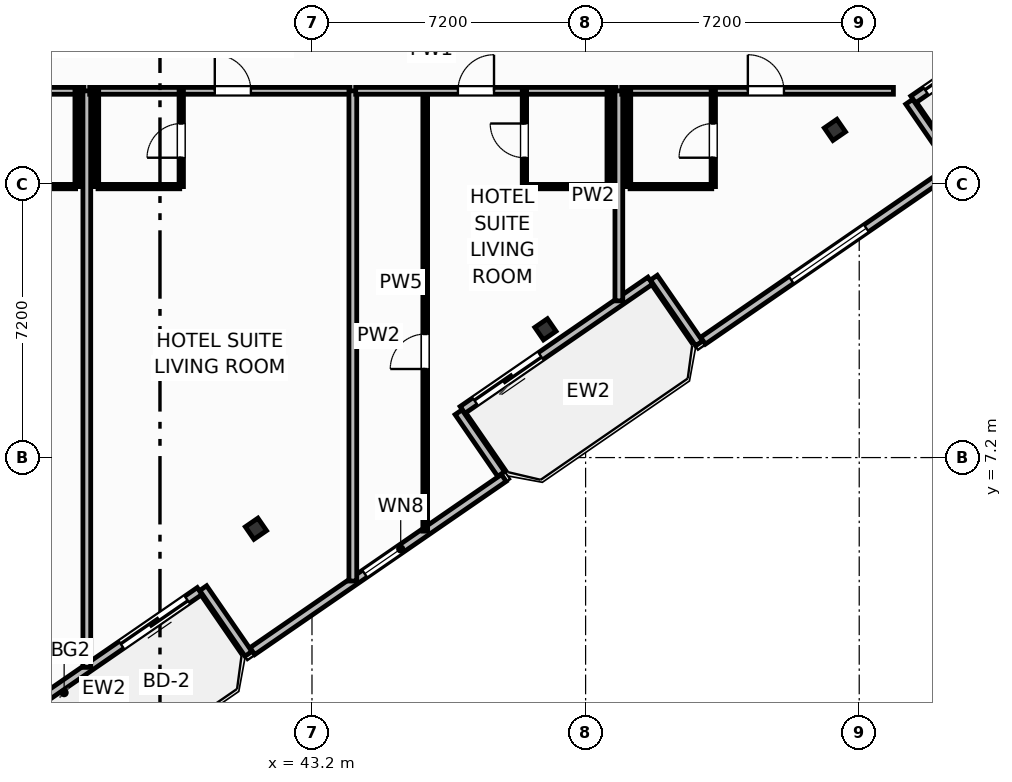
"""IFC4 building model, lengths in metres.
Left out: names, types, materials, properties, quantities, classifications, styles, units other than length and angle.
Written with IfcOpenShell. Run it as: python <this file> out.ifc"""

import sys

from ifc_helpers import new_model, si_unit, direction, frame, frame_2d, origin, origin_2d, place, context, subcontext, project, spatial, rectangle, i_section, extrude, element, fill, save


model = new_model("IFC4")
c1 = context("Model", 3, precision=1e-05, world=origin(), true_north=direction((0.0, 1.0)))
c2 = subcontext(c1, "Body", "Model", "MODEL_VIEW")
j1 = project(units=[si_unit("LENGTHUNIT", "METRE"), si_unit("PLANEANGLEUNIT", "RADIAN")], contexts=[c1])
p1 = place(None, origin())
s1 = spatial("IfcSite", under=j1, at=p1, CompositionType="ELEMENT")
p2 = place(p1, origin())
s2 = spatial("IfcBuilding", under=s1, at=p2, CompositionType="ELEMENT")
p3 = place(p2, frame((0.0, 0.0, 284.1)))
s3 = spatial("IfcBuildingStorey", under=s2, at=p3, CompositionType="ELEMENT", Elevation=284.1)
for number, where, z_axis, x_axis in (
    (1, (41.725, 5.328, 0.0), (0.0, 0.0, 1.0), (0.824, 0.567, 0.0)),
    (2, (49.343, 10.575, 0.0), (0.0, 0.0, 1.0), (0.824, 0.567, 0.0)),
    (3, (56.96, 15.823, 0.0), (0.0, 0.0, 1.0), (0.824, 0.567, 0.0)),
):
    element("IfcColumn", number, at=place(p3, frame(where, z_axis=z_axis, x_axis=x_axis)), inside=s3, PredefinedType="COLUMN", context=c2, shape_type="SweptSolid", body=[
        extrude(i_section(OverallWidth=0.401, OverallDepth=0.399, WebThickness=0.025, FlangeThickness=0.04, FilletRadius=0.022, at=origin_2d()), origin(), (0.0, 0.0, 1.0), 3.7),
    ])
p4 = place(p3, frame((40.244, 3.688, 0.0), z_axis=(0.0, 0.0, 1.0), x_axis=(-0.823541290762, -0.567256328665, 0.0)))
e4 = element("IfcWall", 4, at=p4, inside=s3, PredefinedType="SOLIDWALL", context=c2, shape_type="SweptSolid", body=[
    extrude(rectangle(XDim=5.567, YDim=0.22, at=frame_2d((2.784, 0.0))), origin(), (0.0, 0.0, 1.0), 2.73),
])
p5 = place(p4, frame((0.4, 0.0, 0.0)))
e5 = element("IfcOpeningElement", 5, at=p5, cuts=e4, PredefinedType="OPENING", context=c2, shape_type="SweptSolid", body=[
    extrude(rectangle(XDim=2.1, YDim=2.3, at=frame_2d((1.05, 1.15))), frame((0.0, 0.12, 0.0), z_axis=(0.0, -1.0, 0.0), x_axis=(1.0, 0.0, 0.0)), (0.0, 0.0, 1.0), 0.24),
])
p6 = place(p3, frame((52.103, 11.857, 0.0), z_axis=(0.0, 0.0, 1.0), x_axis=(-0.823534636215, -0.567265989598, 0.0)))
e6 = element("IfcWall", 6, at=p6, inside=s3, PredefinedType="SOLIDWALL", context=c2, shape_type="SweptSolid", body=[
    extrude(rectangle(XDim=6.0, YDim=0.22, at=frame_2d((3.0, 0.0))), origin(), (0.0, 0.0, 1.0), 2.73),
])
p7 = place(p6, frame((3.5, 0.0, 0.0)))
e7 = element("IfcOpeningElement", 7, at=p7, cuts=e6, PredefinedType="OPENING", context=c2, shape_type="SweptSolid", body=[
    extrude(rectangle(XDim=2.1, YDim=2.3, at=frame_2d((1.05, 1.15))), frame((0.0, 0.12, 0.0), z_axis=(0.0, -1.0, 0.0), x_axis=(1.0, 0.0, 0.0)), (0.0, 0.0, 1.0), 0.24),
])
p8 = place(p3, frame((63.605, 19.78, 0.0), z_axis=(0.0, 0.0, 1.0), x_axis=(-0.823541290762, -0.567256328665, 0.0)))
e8 = element("IfcWall", 8, at=p8, inside=s3, PredefinedType="SOLIDWALL", context=c2, shape_type="SweptSolid", body=[
    extrude(rectangle(XDim=5.567, YDim=0.22, at=frame_2d((2.784, 0.0))), origin(), (0.0, 0.0, 1.0), 2.73),
])
p9 = place(p8, frame((3.067, 0.0, 0.0)))
e9 = element("IfcOpeningElement", 9, at=p9, cuts=e8, PredefinedType="OPENING", context=c2, shape_type="SweptSolid", body=[
    extrude(rectangle(XDim=2.1, YDim=2.3, at=frame_2d((1.05, 1.15))), frame((0.0, 0.12, 0.0), z_axis=(0.0, -1.0, 0.0), x_axis=(1.0, 0.0, 0.0)), (0.0, 0.0, 1.0), 0.24),
])
p10 = place(p3, frame((40.337, 3.765, 0.0), z_axis=(0.0, 0.0, 1.0), x_axis=(0.567352541689, -0.823475010816, 0.0)))
e10 = element("IfcWall", 10, at=p10, inside=s3, PredefinedType="SOLIDWALL", context=c2, shape_type="SweptSolid", body=[
    extrude(rectangle(XDim=2.1, YDim=0.22, at=frame_2d((1.05, 0.0))), origin(), (0.0, 0.0, 1.0), 2.73),
])
p11 = place(p3, frame((41.631, 2.106, 0.0), z_axis=(0.0, 0.0, 1.0), x_axis=(0.823530942962, 0.56727135128, 0.0)))
e11 = element("IfcWall", 11, at=p11, inside=s3, PredefinedType="SOLIDWALL", context=c2, shape_type="SweptSolid", body=[
    extrude(rectangle(XDim=8.035, YDim=0.22, at=frame_2d((4.018, 0.0))), origin(), (0.0, 0.0, 1.0), 2.73),
])
p12 = place(p11, frame((3.59, 0.0, 0.8)))
e12 = element("IfcOpeningElement", 12, at=p12, cuts=e11, PredefinedType="OPENING", context=c2, shape_type="SweptSolid", body=[
    extrude(rectangle(XDim=1.15, YDim=1.4, at=frame_2d((0.575, 0.7))), frame((0.0, 0.12, 0.0), z_axis=(0.0, -1.0, 0.0), x_axis=(1.0, 0.0, 0.0)), (0.0, 0.0, 1.0), 0.24),
])
p13 = place(p3, frame((48.177, 6.767, 0.0), z_axis=(0.0, 0.0, 1.0), x_axis=(-0.567273565974, 0.823529417415, 0.0)))
e13 = element("IfcWall", 13, at=p13, inside=s3, PredefinedType="SOLIDWALL", context=c2, shape_type="SweptSolid", body=[
    extrude(rectangle(XDim=1.975, YDim=0.22, at=frame_2d((0.988, 0.0))), origin(), (0.0, 0.0, 1.0), 2.73),
])
p14 = place(p3, frame((52.196, 11.933, 0.0), z_axis=(0.0, 0.0, 1.0), x_axis=(0.56729822855, -0.823512428494, 0.0)))
e14 = element("IfcWall", 14, at=p14, inside=s3, PredefinedType="SOLIDWALL", context=c2, shape_type="SweptSolid", body=[
    extrude(rectangle(XDim=2.1, YDim=0.22, at=frame_2d((1.05, 0.0))), origin(), (0.0, 0.0, 1.0), 2.73),
])
p15 = place(p3, frame((53.49, 10.275, 0.0), z_axis=(0.0, 0.0, 1.0), x_axis=(0.823530942962, 0.56727135128, 0.0)))
e15 = element("IfcWall", 15, at=p15, inside=s3, PredefinedType="SOLIDWALL", context=c2, shape_type="SweptSolid", body=[
    extrude(rectangle(XDim=8.035, YDim=0.22, at=frame_2d((4.018, 0.0))), origin(), (0.0, 0.0, 1.0), 2.73),
])
p16 = place(p15, frame((2.817, 0.0, 0.8)))
e16 = element("IfcOpeningElement", 16, at=p16, cuts=e15, PredefinedType="OPENING", context=c2, shape_type="SweptSolid", body=[
    extrude(rectangle(XDim=2.4, YDim=1.85, at=frame_2d((1.2, 0.925))), frame((0.0, 0.12, 0.0), z_axis=(0.0, -1.0, 0.0), x_axis=(1.0, 0.0, 0.0)), (0.0, 0.0, 1.0), 0.24),
])
p17 = place(p3, frame((60.036, 14.936, 0.0), z_axis=(0.0, 0.0, 1.0), x_axis=(-0.567273565974, 0.823529417415, 0.0)))
e17 = element("IfcWall", 17, at=p17, inside=s3, PredefinedType="SOLIDWALL", context=c2, shape_type="SweptSolid", body=[
    extrude(rectangle(XDim=1.975, YDim=0.22, at=frame_2d((0.988, 0.0))), origin(), (0.0, 0.0, 1.0), 2.73),
])
p18 = place(p3, frame((30.35, 16.85, 0.0), z_axis=(0.0, 0.0, 1.0), x_axis=(1.0, 0.0, 0.0)))
e18 = element("IfcWall", 18, at=p18, inside=s3, PredefinedType="PARTITIONING", context=c2, shape_type="SweptSolid", body=[
    extrude(rectangle(XDim=6.85, YDim=0.18, at=frame_2d((3.425, 0.0))), origin(), (0.0, 0.0, 1.0), 3.45),
])
p19 = place(p18, frame((0.902, 0.0, 0.0)))
e19 = element("IfcOpeningElement", 19, at=p19, cuts=e18, PredefinedType="OPENING", context=c2, shape_type="SweptSolid", body=[
    extrude(rectangle(XDim=0.95, YDim=2.15, at=frame_2d((0.475, 1.075))), frame((0.0, 0.1, 0.0), z_axis=(0.0, -1.0, 0.0), x_axis=(1.0, 0.0, 0.0)), (0.0, 0.0, 1.0), 0.2),
])
p20 = place(p3, frame((34.83, 14.33, 0.0), z_axis=(0.0, 0.0, 1.0), x_axis=(1.0, 0.0, 0.0)))
e20 = element("IfcWall", 20, at=p20, inside=s3, PredefinedType="PARTITIONING", context=c2, shape_type="SweptSolid", body=[
    extrude(rectangle(XDim=2.15, YDim=0.115, at=frame_2d((1.075, 0.0))), origin(), (0.0, 0.0, 1.0), 3.45),
])
p21 = place(p3, frame((37.02, 14.33, 0.0), z_axis=(0.0, 0.0, 1.0), x_axis=(0.0, 1.0, 0.0)))
e21 = element("IfcWall", 21, at=p21, inside=s3, PredefinedType="PARTITIONING", context=c2, shape_type="SweptSolid", body=[
    extrude(rectangle(XDim=2.52, YDim=0.115, at=frame_2d((1.26, 0.0))), origin(), (0.0, 0.0, 1.0), 3.45),
])
p22 = place(p3, frame((37.275, 1.68, 0.0), z_axis=(0.0, 0.0, 1.0), x_axis=(0.0, 1.0, 0.0)))
e22 = element("IfcWall", 22, at=p22, inside=s3, PredefinedType="PARTITIONING", context=c2, shape_type="SweptSolid", body=[
    extrude(rectangle(XDim=15.17, YDim=0.205, at=frame_2d((7.585, 0.0))), origin(), (0.0, 0.0, 1.0), 3.45),
])
p23 = place(p3, frame((37.35, 16.85, 0.0), z_axis=(0.0, 0.0, 1.0), x_axis=(1.0, 0.0, 0.0)))
e23 = element("IfcWall", 23, at=p23, inside=s3, PredefinedType="PARTITIONING", context=c2, shape_type="SweptSolid", body=[
    extrude(rectangle(XDim=6.85, YDim=0.18, at=frame_2d((3.425, 0.0))), origin(), (0.0, 0.0, 1.0), 3.45),
])
p24 = place(p23, frame((3.292, 0.0, 0.0)))
e24 = element("IfcOpeningElement", 24, at=p24, cuts=e23, PredefinedType="OPENING", context=c2, shape_type="SweptSolid", body=[
    extrude(rectangle(XDim=0.95, YDim=2.15, at=frame_2d((0.475, 1.075))), frame((0.0, 0.1, 0.0), z_axis=(0.0, -1.0, 0.0), x_axis=(1.0, 0.0, 0.0)), (0.0, 0.0, 1.0), 0.2),
])
p25 = place(p3, frame((37.57, 14.33, 0.0), z_axis=(0.0, 0.0, 1.0), x_axis=(1.0, 0.0, 0.0)))
e25 = element("IfcWall", 25, at=p25, inside=s3, PredefinedType="PARTITIONING", context=c2, shape_type="SweptSolid", body=[
    extrude(rectangle(XDim=2.15, YDim=0.115, at=frame_2d((1.075, 0.0))), origin(), (0.0, 0.0, 1.0), 3.45),
])
p26 = place(p3, frame((39.76, 14.33, 0.0), z_axis=(0.0, 0.0, 1.0), x_axis=(0.0, 1.0, 0.0)))
e26 = element("IfcWall", 26, at=p26, inside=s3, PredefinedType="PARTITIONING", context=c2, shape_type="SweptSolid", body=[
    extrude(rectangle(XDim=2.52, YDim=0.115, at=frame_2d((1.26, 0.0))), origin(), (0.0, 0.0, 1.0), 3.45),
])
p27 = place(p26, frame((0.76, 0.0, 0.0)))
e27 = element("IfcOpeningElement", 27, at=p27, cuts=e26, PredefinedType="OPENING", context=c2, shape_type="SweptSolid", body=[
    extrude(rectangle(XDim=0.9, YDim=2.05, at=frame_2d((0.45, 1.025))), frame((0.0, 0.067, 0.0), z_axis=(0.0, -1.0, 0.0), x_axis=(1.0, 0.0, 0.0)), (0.0, 0.0, 1.0), 0.135),
])
p28 = place(p3, frame((37.53, 14.33, 0.0), z_axis=(0.0, 0.0, 1.0), x_axis=(0.0, 1.0, 0.0)))
e28 = element("IfcWall", 28, at=p28, inside=s3, PredefinedType="PARTITIONING", context=c2, shape_type="SweptSolid", body=[
    extrude(rectangle(XDim=2.52, YDim=0.115, at=frame_2d((1.26, 0.0))), origin(), (0.0, 0.0, 1.0), 3.45),
])
p29 = place(p3, frame((44.275, 3.952, 0.0), z_axis=(0.0, 0.0, 1.0), x_axis=(0.0, 1.0, 0.0)))
e29 = element("IfcWall", 29, at=p29, inside=s3, PredefinedType="PARTITIONING", context=c2, shape_type="SweptSolid", body=[
    extrude(rectangle(XDim=12.898, YDim=0.205, at=frame_2d((6.449, 0.0))), origin(), (0.0, 0.0, 1.0), 2.739),
])
p30 = place(p3, frame((46.18, 5.264, 0.0), z_axis=(0.0, 0.0, 1.0), x_axis=(0.0, 1.0, 0.0)))
e30 = element("IfcWall", 30, at=p30, inside=s3, PredefinedType="PARTITIONING", context=c2, shape_type="SweptSolid", body=[
    extrude(rectangle(XDim=11.586, YDim=0.125, at=frame_2d((5.793, 0.0))), origin(), (0.0, 0.0, 1.0), 3.45),
])
p31 = place(p30, frame((4.267, 0.0, 0.0)))
e31 = element("IfcOpeningElement", 31, at=p31, cuts=e30, PredefinedType="OPENING", context=c2, shape_type="SweptSolid", body=[
    extrude(rectangle(XDim=0.92, YDim=2.05, at=frame_2d((0.46, 1.025))), frame((0.0, 0.073, 0.0), z_axis=(0.0, -1.0, 0.0), x_axis=(1.0, 0.0, 0.0)), (0.0, 0.0, 1.0), 0.145),
])
p32 = place(p3, frame((44.35, 16.85, 0.0), z_axis=(0.0, 0.0, 1.0), x_axis=(1.0, 0.0, 0.0)))
e32 = element("IfcWall", 32, at=p32, inside=s3, PredefinedType="PARTITIONING", context=c2, shape_type="SweptSolid", body=[
    extrude(rectangle(XDim=6.85, YDim=0.18, at=frame_2d((3.425, 0.0))), origin(), (0.0, 0.0, 1.0), 3.45),
])
p33 = place(p32, frame((2.69, 0.0, 0.0)))
e33 = element("IfcOpeningElement", 33, at=p33, cuts=e32, PredefinedType="OPENING", context=c2, shape_type="SweptSolid", body=[
    extrude(rectangle(XDim=0.95, YDim=2.15, at=frame_2d((0.475, 1.075))), frame((0.0, 0.1, 0.0), z_axis=(0.0, -1.0, 0.0), x_axis=(1.0, 0.0, 0.0)), (0.0, 0.0, 1.0), 0.2),
])
p34 = place(p3, frame((48.83, 14.33, 0.0), z_axis=(0.0, 0.0, 1.0), x_axis=(1.0, 0.0, 0.0)))
e34 = element("IfcWall", 34, at=p34, inside=s3, PredefinedType="PARTITIONING", context=c2, shape_type="SweptSolid", body=[
    extrude(rectangle(XDim=2.15, YDim=0.115, at=frame_2d((1.075, 0.0))), origin(), (0.0, 0.0, 1.0), 3.45),
])
p35 = place(p3, frame((48.79, 14.33, 0.0), z_axis=(0.0, 0.0, 1.0), x_axis=(0.0, 1.0, 0.0)))
e35 = element("IfcWall", 35, at=p35, inside=s3, PredefinedType="PARTITIONING", context=c2, shape_type="SweptSolid", body=[
    extrude(rectangle(XDim=2.52, YDim=0.115, at=frame_2d((1.26, 0.0))), origin(), (0.0, 0.0, 1.0), 3.45),
])
p36 = place(p35, frame((0.76, 0.0, 0.0)))
e36 = element("IfcOpeningElement", 36, at=p36, cuts=e35, PredefinedType="OPENING", context=c2, shape_type="SweptSolid", body=[
    extrude(rectangle(XDim=0.9, YDim=2.05, at=frame_2d((0.45, 1.025))), frame((0.0, 0.067, 0.0), z_axis=(0.0, -1.0, 0.0), x_axis=(1.0, 0.0, 0.0)), (0.0, 0.0, 1.0), 0.135),
])
p37 = place(p3, frame((51.02, 14.33, 0.0), z_axis=(0.0, 0.0, 1.0), x_axis=(0.0, 1.0, 0.0)))
e37 = element("IfcWall", 37, at=p37, inside=s3, PredefinedType="PARTITIONING", context=c2, shape_type="SweptSolid", body=[
    extrude(rectangle(XDim=2.52, YDim=0.115, at=frame_2d((1.26, 0.0))), origin(), (0.0, 0.0, 1.0), 3.45),
])
p38 = place(p3, frame((51.275, 11.323, 0.0), z_axis=(0.0, 0.0, 1.0), x_axis=(0.0, 1.0, 0.0)))
e38 = element("IfcWall", 38, at=p38, inside=s3, PredefinedType="PARTITIONING", context=c2, shape_type="SweptSolid", body=[
    extrude(rectangle(XDim=5.527, YDim=0.205, at=frame_2d((2.763, 0.0))), origin(), (0.0, 0.0, 1.0), 3.45),
])
p39 = place(p3, frame((51.35, 16.85, 0.0), z_axis=(0.0, 0.0, 1.0), x_axis=(1.0, 0.0, 0.0)))
e39 = element("IfcWall", 39, at=p39, inside=s3, PredefinedType="PARTITIONING", context=c2, shape_type="SweptSolid", body=[
    extrude(rectangle(XDim=7.15, YDim=0.18, at=frame_2d((3.575, 0.0))), origin(), (0.0, 0.0, 1.0), 3.45),
])
p40 = place(p39, frame((3.32, 0.0, 0.0)))
e40 = element("IfcOpeningElement", 40, at=p40, cuts=e39, PredefinedType="OPENING", context=c2, shape_type="SweptSolid", body=[
    extrude(rectangle(XDim=0.95, YDim=2.15, at=frame_2d((0.475, 1.075))), frame((0.0, 0.1, 0.0), z_axis=(0.0, -1.0, 0.0), x_axis=(1.0, 0.0, 0.0)), (0.0, 0.0, 1.0), 0.2),
])
p41 = place(p3, frame((51.57, 14.33, 0.0), z_axis=(0.0, 0.0, 1.0), x_axis=(1.0, 0.0, 0.0)))
e41 = element("IfcWall", 41, at=p41, inside=s3, PredefinedType="PARTITIONING", context=c2, shape_type="SweptSolid", body=[
    extrude(rectangle(XDim=2.15, YDim=0.115, at=frame_2d((1.075, 0.0))), origin(), (0.0, 0.0, 1.0), 3.45),
])
p42 = place(p3, frame((53.76, 14.33, 0.0), z_axis=(0.0, 0.0, 1.0), x_axis=(0.0, 1.0, 0.0)))
e42 = element("IfcWall", 42, at=p42, inside=s3, PredefinedType="PARTITIONING", context=c2, shape_type="SweptSolid", body=[
    extrude(rectangle(XDim=2.52, YDim=0.115, at=frame_2d((1.26, 0.0))), origin(), (0.0, 0.0, 1.0), 3.45),
])
p43 = place(p42, frame((0.76, 0.0, 0.0)))
e43 = element("IfcOpeningElement", 43, at=p43, cuts=e42, PredefinedType="OPENING", context=c2, shape_type="SweptSolid", body=[
    extrude(rectangle(XDim=0.9, YDim=2.05, at=frame_2d((0.45, 1.025))), frame((0.0, 0.067, 0.0), z_axis=(0.0, -1.0, 0.0), x_axis=(1.0, 0.0, 0.0)), (0.0, 0.0, 1.0), 0.135),
])
p44 = place(p3, frame((51.53, 14.33, 0.0), z_axis=(0.0, 0.0, 1.0), x_axis=(0.0, 1.0, 0.0)))
e44 = element("IfcWall", 44, at=p44, inside=s3, PredefinedType="PARTITIONING", context=c2, shape_type="SweptSolid", body=[
    extrude(rectangle(XDim=2.52, YDim=0.115, at=frame_2d((1.26, 0.0))), origin(), (0.0, 0.0, 1.0), 3.45),
])
p45 = place(p5, origin())
e45 = element("IfcDoor", 45, at=p45, inside=s3, OperationType="SLIDING_TO_LEFT", PredefinedType="DOOR", context=c2, shape_type="SweptSolid", body=[
    extrude(rectangle(XDim=2.1, YDim=2.3, at=frame_2d((1.05, 1.15))), frame((0.0, 0.025, 0.0), z_axis=(0.0, -1.0, 0.0), x_axis=(1.0, 0.0, 0.0)), (0.0, 0.0, 1.0), 0.05),
])
fill(e5, e45)
p46 = place(p7, origin())
e46 = element("IfcDoor", 46, at=p46, inside=s3, OperationType="SLIDING_TO_LEFT", PredefinedType="DOOR", context=c2, shape_type="SweptSolid", body=[
    extrude(rectangle(XDim=2.1, YDim=2.3, at=frame_2d((1.05, 1.15))), frame((0.0, 0.025, 0.0), z_axis=(0.0, -1.0, 0.0), x_axis=(1.0, 0.0, 0.0)), (0.0, 0.0, 1.0), 0.05),
])
fill(e7, e46)
p47 = place(p9, origin())
e47 = element("IfcDoor", 47, at=p47, inside=s3, OperationType="SLIDING_TO_LEFT", PredefinedType="DOOR", context=c2, shape_type="SweptSolid", body=[
    extrude(rectangle(XDim=2.1, YDim=2.3, at=frame_2d((1.05, 1.15))), frame((0.0, 0.025, 0.0), z_axis=(0.0, -1.0, 0.0), x_axis=(1.0, 0.0, 0.0)), (0.0, 0.0, 1.0), 0.05),
])
fill(e9, e47)
p48 = place(p16, origin())
e48 = element("IfcWindow", 48, at=p48, inside=s3, PartitioningType="SINGLE_PANEL", PredefinedType="WINDOW", context=c2, shape_type="SweptSolid", body=[
    extrude(rectangle(XDim=2.4, YDim=1.85, at=frame_2d((1.2, 0.925))), frame((0.0, 0.03, 0.0), z_axis=(0.0, -1.0, 0.0), x_axis=(1.0, 0.0, 0.0)), (0.0, 0.0, 1.0), 0.06),
])
fill(e16, e48)
p49 = place(p24, origin())
e49 = element("IfcDoor", 49, at=p49, inside=s3, OperationType="SINGLE_SWING_LEFT", PredefinedType="DOOR", context=c2, shape_type="SweptSolid", body=[
    extrude(rectangle(XDim=0.95, YDim=2.15, at=frame_2d((0.475, 1.075))), frame((0.0, 0.025, 0.0), z_axis=(0.0, -1.0, 0.0), x_axis=(1.0, 0.0, 0.0)), (0.0, 0.0, 1.0), 0.05),
])
fill(e24, e49)
p50 = place(p27, origin())
e50 = element("IfcDoor", 50, at=p50, inside=s3, OperationType="SINGLE_SWING_LEFT", PredefinedType="DOOR", context=c2, shape_type="SweptSolid", body=[
    extrude(rectangle(XDim=0.9, YDim=2.05, at=frame_2d((0.45, 1.025))), frame((0.0, 0.025, 0.0), z_axis=(0.0, -1.0, 0.0), x_axis=(1.0, 0.0, 0.0)), (0.0, 0.0, 1.0), 0.05),
])
fill(e27, e50)
p51 = place(p31, origin())
e51 = element("IfcDoor", 51, at=p51, inside=s3, OperationType="SINGLE_SWING_LEFT", PredefinedType="DOOR", context=c2, shape_type="SweptSolid", body=[
    extrude(rectangle(XDim=0.92, YDim=2.05, at=frame_2d((0.46, 1.025))), frame((0.0, 0.025, 0.0), z_axis=(0.0, -1.0, 0.0), x_axis=(1.0, 0.0, 0.0)), (0.0, 0.0, 1.0), 0.05),
])
fill(e31, e51)
p52 = place(p33, origin())
e52 = element("IfcDoor", 52, at=p52, inside=s3, OperationType="SINGLE_SWING_RIGHT", PredefinedType="DOOR", context=c2, shape_type="SweptSolid", body=[
    extrude(rectangle(XDim=0.95, YDim=2.15, at=frame_2d((0.475, 1.075))), frame((0.0, 0.025, 0.0), z_axis=(0.0, -1.0, 0.0), x_axis=(1.0, 0.0, 0.0)), (0.0, 0.0, 1.0), 0.05),
])
fill(e33, e52)
p53 = place(p36, origin())
e53 = element("IfcDoor", 53, at=p53, inside=s3, OperationType="SINGLE_SWING_RIGHT", PredefinedType="DOOR", context=c2, shape_type="SweptSolid", body=[
    extrude(rectangle(XDim=0.9, YDim=2.05, at=frame_2d((0.45, 1.025))), frame((0.0, 0.025, 0.0), z_axis=(0.0, -1.0, 0.0), x_axis=(1.0, 0.0, 0.0)), (0.0, 0.0, 1.0), 0.05),
])
fill(e36, e53)
p54 = place(p40, origin())
e54 = element("IfcDoor", 54, at=p54, inside=s3, OperationType="SINGLE_SWING_LEFT", PredefinedType="DOOR", context=c2, shape_type="SweptSolid", body=[
    extrude(rectangle(XDim=0.95, YDim=2.15, at=frame_2d((0.475, 1.075))), frame((0.0, 0.025, 0.0), z_axis=(0.0, -1.0, 0.0), x_axis=(1.0, 0.0, 0.0)), (0.0, 0.0, 1.0), 0.05),
])
fill(e40, e54)
p55 = place(p43, origin())
e55 = element("IfcDoor", 55, at=p55, inside=s3, OperationType="SINGLE_SWING_LEFT", PredefinedType="DOOR", context=c2, shape_type="SweptSolid", body=[
    extrude(rectangle(XDim=0.9, YDim=2.05, at=frame_2d((0.45, 1.025))), frame((0.0, 0.025, 0.0), z_axis=(0.0, -1.0, 0.0), x_axis=(1.0, 0.0, 0.0)), (0.0, 0.0, 1.0), 0.05),
])
fill(e43, e55)
p56 = place(p12, origin())
e56 = element("IfcWindow", 56, at=p56, inside=s3, PartitioningType="SINGLE_PANEL", PredefinedType="WINDOW", context=c2, shape_type="SweptSolid", body=[
    extrude(rectangle(XDim=1.15, YDim=1.4, at=frame_2d((0.575, 0.7))), frame((0.0, 0.03, 0.0), z_axis=(0.0, -1.0, 0.0), x_axis=(1.0, 0.0, 0.0)), (0.0, 0.0, 1.0), 0.06),
])
fill(e12, e56)
save(model, sys.argv[1])
